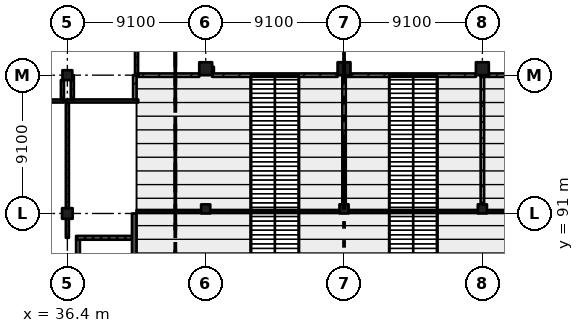
"""IFC4 building model, lengths in metres.
Left out: names, types, materials, properties, quantities, classifications, styles, units other than length and angle.
Written with IfcOpenShell. Run it as: python <this file> out.ifc"""

import sys

from ifc_helpers import new_model, si_unit, direction, frame, frame_2d, origin, origin_2d, place, context, subcontext, project, spatial, rectangle, extrude, element, fill, save


model = new_model("IFC4")
c1 = context("Model", 3, precision=1e-05, world=origin(), true_north=direction((0.0, 1.0)))
c2 = subcontext(c1, "Body", "Model", "MODEL_VIEW")
j1 = project(units=[si_unit("LENGTHUNIT", "METRE"), si_unit("PLANEANGLEUNIT", "RADIAN")], contexts=[c1])
p1 = place(None, origin())
s1 = spatial("IfcSite", under=j1, at=p1, CompositionType="ELEMENT")
p2 = place(p1, origin())
s2 = spatial("IfcBuilding", under=s1, at=p2, CompositionType="ELEMENT")
p3 = place(p2, frame((0.0, 0.0, 15.47)))
s3 = spatial("IfcBuildingStorey", under=s2, at=p3, CompositionType="ELEMENT", Elevation=15.47)
p4 = place(p3, frame((36.4, 91.0, 0.0), z_axis=(0.0, 0.0, 1.0), x_axis=(1.0, 0.0, 0.0)))
e1 = element("IfcColumn", 1, at=p4, inside=s3, PredefinedType="COLUMN", context=c2, shape_type="SweptSolid", body=[
    extrude(rectangle(XDim=0.7, YDim=0.7, at=origin_2d()), origin(), (0.0, 0.0, 1.0), 4.55),
])
p5 = place(p3, frame((36.4, 100.1, 0.0), z_axis=(0.0, 0.0, 1.0), x_axis=(1.0, 0.0, 0.0)))
e2 = element("IfcColumn", 2, at=p5, inside=s3, PredefinedType="COLUMN", context=c2, shape_type="SweptSolid", body=[
    extrude(rectangle(XDim=0.65, YDim=0.65, at=origin_2d()), origin(), (0.0, 0.0, 1.0), 4.55),
])
p6 = place(p3, frame((45.5, 91.3, 0.0), z_axis=(0.0, 0.0, 1.0), x_axis=(1.0, 0.0, 0.0)))
e3 = element("IfcColumn", 3, at=p6, inside=s3, PredefinedType="COLUMN", context=c2, shape_type="SweptSolid", body=[
    extrude(rectangle(XDim=0.6, YDim=0.6, at=origin_2d()), origin(), (0.0, 0.0, 1.0), 2.71),
])
p7 = place(p3, frame((45.5, 100.525, 0.0), z_axis=(0.0, 0.0, 1.0), x_axis=(1.0, 0.0, 0.0)))
e4 = element("IfcColumn", 4, at=p7, inside=s3, PredefinedType="COLUMN", context=c2, shape_type="SweptSolid", body=[
    extrude(rectangle(XDim=0.85, YDim=0.85, at=origin_2d()), origin(), (0.0, 0.0, 1.0), 4.55),
])
p8 = place(p3, frame((54.6, 91.3, 0.0), z_axis=(0.0, 0.0, 1.0), x_axis=(1.0, 0.0, 0.0)))
e5 = element("IfcColumn", 5, at=p8, inside=s3, PredefinedType="COLUMN", context=c2, shape_type="SweptSolid", body=[
    extrude(rectangle(XDim=0.6, YDim=0.6, at=origin_2d()), origin(), (0.0, 0.0, 1.0), 2.71),
])
p9 = place(p3, frame((54.6, 100.525, 0.0), z_axis=(0.0, 0.0, 1.0), x_axis=(1.0, 0.0, 0.0)))
e6 = element("IfcColumn", 6, at=p9, inside=s3, PredefinedType="COLUMN", context=c2, shape_type="SweptSolid", body=[
    extrude(rectangle(XDim=0.85, YDim=0.85, at=origin_2d()), origin(), (0.0, 0.0, 1.0), 4.55),
])
p10 = place(p3, frame((63.7, 91.3, 0.0), z_axis=(0.0, 0.0, 1.0), x_axis=(1.0, 0.0, 0.0)))
e7 = element("IfcColumn", 7, at=p10, inside=s3, PredefinedType="COLUMN", context=c2, shape_type="SweptSolid", body=[
    extrude(rectangle(XDim=0.6, YDim=0.6, at=origin_2d()), origin(), (0.0, 0.0, 1.0), 2.71),
])
p11 = place(p3, frame((63.7, 100.525, 0.0), z_axis=(0.0, 0.0, 1.0), x_axis=(1.0, 0.0, 0.0)))
e8 = element("IfcColumn", 8, at=p11, inside=s3, PredefinedType="COLUMN", context=c2, shape_type="SweptSolid", body=[
    extrude(rectangle(XDim=0.85, YDim=0.85, at=origin_2d()), origin(), (0.0, 0.0, 1.0), 4.55),
])
p12 = place(p3, frame((40.8, 68.25, 0.0), z_axis=(0.0, 0.0, 1.0), x_axis=(0.0, 1.0, 0.0)))
e9 = element("IfcWall", 9, at=p12, inside=s3, PredefinedType="SHEAR", context=c2, shape_type="SweptSolid", body=[
    extrude(rectangle(XDim=22.75, YDim=0.3, at=frame_2d((11.375, 0.0))), origin(), (0.0, 0.0, 1.0), 4.55),
])
p13 = place(p3, frame((33.43, 98.4, 0.0), z_axis=(0.0, 0.0, 1.0), x_axis=(1.0, 0.0, 0.0)))
e10 = element("IfcWall", 10, at=p13, inside=s3, PredefinedType="PARTITIONING", context=c2, shape_type="SweptSolid", body=[
    extrude(rectangle(XDim=2.745, YDim=0.2, at=frame_2d((1.373, 0.0))), origin(), (0.0, 0.0, 1.0), 4.3),
])
p14 = place(p13, frame((0.45, 0.0, 0.0)))
e11 = element("IfcOpeningElement", 11, at=p14, cuts=e10, PredefinedType="OPENING", context=c2, shape_type="SweptSolid", body=[
    extrude(rectangle(XDim=1.8, YDim=2.4, at=frame_2d((0.9, 1.2))), frame((0.0, 0.11, 0.0), z_axis=(0.0, -1.0, 0.0), x_axis=(1.0, 0.0, 0.0)), (0.0, 0.0, 1.0), 0.22),
])
p15 = place(p3, frame((36.075, 98.5, 0.0), z_axis=(0.0, 0.0, 1.0), x_axis=(0.0, 1.0, 0.0)))
e12 = element("IfcWall", 12, at=p15, inside=s3, PredefinedType="PARTITIONING", context=c2, shape_type="SweptSolid", body=[
    extrude(rectangle(XDim=1.275, YDim=0.2, at=frame_2d((0.637, 0.0))), origin(), (0.0, 0.0, 1.0), 4.3),
])
p16 = place(p3, frame((36.4, 90.65, 0.0), z_axis=(0.0, 0.0, 1.0), x_axis=(0.0, -1.0, 0.0)))
e13 = element("IfcWall", 13, at=p16, inside=s3, PredefinedType="PARTITIONING", context=c2, shape_type="SweptSolid", body=[
    extrude(rectangle(XDim=1.25, YDim=0.2, at=frame_2d((0.625, 0.0))), origin(), (0.0, 0.0, 1.0), 3.55),
])
p17 = place(p3, frame((36.4, 98.3, 0.0), z_axis=(0.0, 0.0, 1.0), x_axis=(0.0, -1.0, 0.0)))
e14 = element("IfcWall", 14, at=p17, inside=s3, PredefinedType="PARTITIONING", context=c2, shape_type="SweptSolid", body=[
    extrude(rectangle(XDim=6.95, YDim=0.2, at=frame_2d((3.475, 0.0))), origin(), (0.0, 0.0, 1.0), 3.55),
])
p18 = place(p17, frame((0.85, 0.0, 0.0)))
e15 = element("IfcOpeningElement", 15, at=p18, cuts=e14, PredefinedType="OPENING", context=c2, shape_type="SweptSolid", body=[
    extrude(rectangle(XDim=1.8, YDim=2.4, at=frame_2d((0.9, 1.2))), frame((0.0, 0.11, 0.0), z_axis=(0.0, -1.0, 0.0), x_axis=(1.0, 0.0, 0.0)), (0.0, 0.0, 1.0), 0.22),
])
p19 = place(p17, frame((4.35, 0.0, 0.0)))
e16 = element("IfcOpeningElement", 16, at=p19, cuts=e14, PredefinedType="OPENING", context=c2, shape_type="SweptSolid", body=[
    extrude(rectangle(XDim=1.8, YDim=2.4, at=frame_2d((0.9, 1.2))), frame((0.0, 0.11, 0.0), z_axis=(0.0, -1.0, 0.0), x_axis=(1.0, 0.0, 0.0)), (0.0, 0.0, 1.0), 0.22),
])
p20 = place(p3, frame((36.3, 98.4, 0.0), z_axis=(0.0, 0.0, 1.0), x_axis=(1.0, 0.0, 0.0)))
e17 = element("IfcWall", 17, at=p20, inside=s3, PredefinedType="PARTITIONING", context=c2, shape_type="SweptSolid", body=[
    extrude(rectangle(XDim=4.762, YDim=0.2, at=frame_2d((2.381, 0.0))), origin(), (0.0, 0.0, 1.0), 4.3),
])
p21 = place(p20, frame((1.675, 0.0, 0.0)))
e18 = element("IfcOpeningElement", 18, at=p21, cuts=e17, PredefinedType="OPENING", context=c2, shape_type="SweptSolid", body=[
    extrude(rectangle(XDim=1.8, YDim=2.4, at=frame_2d((0.9, 1.2))), frame((0.0, 0.11, 0.0), z_axis=(0.0, -1.0, 0.0), x_axis=(1.0, 0.0, 0.0)), (0.0, 0.0, 1.0), 0.22),
])
p22 = place(p3, frame((36.725, 98.5, 0.0), z_axis=(0.0, 0.0, 1.0), x_axis=(0.0, 1.0, 0.0)))
e19 = element("IfcWall", 19, at=p22, inside=s3, PredefinedType="PARTITIONING", context=c2, shape_type="SweptSolid", body=[
    extrude(rectangle(XDim=1.6, YDim=0.2, at=frame_2d((0.8, 0.0))), origin(), (0.0, 0.0, 1.0), 4.3),
])
p23 = place(p3, frame((37.1, 89.275, 0.0), z_axis=(0.0, 0.0, 1.0), x_axis=(0.0, -1.0, 0.0)))
e20 = element("IfcWall", 20, at=p23, inside=s3, PredefinedType="SOLIDWALL", context=c2, shape_type="SweptSolid", body=[
    extrude(rectangle(XDim=6.925, YDim=0.25, at=frame_2d((3.462, 0.0))), origin(), (0.0, 0.0, 1.0), 4.3),
])
p24 = place(p3, frame((40.65, 89.4, 0.0), z_axis=(0.0, 0.0, 1.0), x_axis=(-1.0, 0.0, 0.0)))
e21 = element("IfcWall", 21, at=p24, inside=s3, PredefinedType="SOLIDWALL", context=c2, shape_type="SweptSolid", body=[
    extrude(rectangle(XDim=3.675, YDim=0.25, at=frame_2d((1.837, 0.0))), origin(), (0.0, 0.0, 1.0), 4.3),
])
p25 = place(p24, frame((1.35, 0.0, 0.0)))
e22 = element("IfcOpeningElement", 22, at=p25, cuts=e21, PredefinedType="OPENING", context=c2, shape_type="SweptSolid", body=[
    extrude(rectangle(XDim=1.0, YDim=2.1, at=frame_2d((0.5, 1.05))), frame((0.0, 0.135, 0.0), z_axis=(0.0, -1.0, 0.0), x_axis=(1.0, 0.0, 0.0)), (0.0, 0.0, 1.0), 0.27),
])
p26 = place(p3, frame((40.836, 100.1, 0.0), z_axis=(0.0, 0.0, 1.0), x_axis=(0.0, -1.0, 0.0)))
e23 = element("IfcWall", 23, at=p26, inside=s3, PredefinedType="PARTITIONING", context=c2, shape_type="SweptSolid", body=[
    extrude(rectangle(XDim=1.6, YDim=0.225, at=frame_2d((0.8, 0.0))), origin(), (0.0, 0.0, 1.0), 4.3),
])
p27 = place(p3, frame((40.95, 103.7, 0.0), z_axis=(0.0, 0.0, 1.0), x_axis=(0.0, -1.0, 0.0)))
e24 = element("IfcWall", 24, at=p27, inside=s3, PredefinedType="PARTITIONING", context=c2, shape_type="SweptSolid", body=[
    extrude(rectangle(XDim=3.6, YDim=0.2, at=frame_2d((1.8, 0.0))), origin(), (0.0, 0.0, 1.0), 3.7),
])
p28 = place(p27, frame((0.65, 0.0, 0.0)))
e25 = element("IfcOpeningElement", 25, at=p28, cuts=e24, PredefinedType="OPENING", context=c2, shape_type="SweptSolid", body=[
    extrude(rectangle(XDim=2.4, YDim=2.4, at=frame_2d((1.2, 1.2))), frame((0.0, 0.11, 0.0), z_axis=(0.0, -1.0, 0.0), x_axis=(1.0, 0.0, 0.0)), (0.0, 0.0, 1.0), 0.22),
])
p29 = place(p3, frame((45.075, 100.1, 0.0), z_axis=(0.0, 0.0, 1.0), x_axis=(-1.0, 0.0, 0.0)))
e26 = element("IfcWall", 26, at=p29, inside=s3, PredefinedType="PARTITIONING", context=c2, shape_type="SweptSolid", body=[
    extrude(rectangle(XDim=4.012, YDim=0.225, at=frame_2d((2.006, 0.0))), origin(), (0.0, 0.0, 1.0), 3.6),
])
p30 = place(p3, frame((45.925, 100.225, 0.0), z_axis=(0.0, 0.0, 1.0), x_axis=(0.0, 1.0, 0.0)))
e27 = element("IfcWall", 27, at=p30, inside=s3, PredefinedType="PARTITIONING", context=c2, shape_type="SweptSolid", body=[
    extrude(rectangle(XDim=0.425, YDim=0.225, at=frame_2d((0.212, 0.0))), origin(), (0.0, 0.0, 1.0), 4.3),
])
p31 = place(p3, frame((54.175, 100.1, 0.0), z_axis=(0.0, 0.0, 1.0), x_axis=(-1.0, 0.0, 0.0)))
e28 = element("IfcWall", 28, at=p31, inside=s3, PredefinedType="PARTITIONING", context=c2, shape_type="SweptSolid", body=[
    extrude(rectangle(XDim=8.25, YDim=0.225, at=frame_2d((4.125, 0.0))), origin(), (0.0, 0.0, 1.0), 3.6),
])
p32 = place(p31, frame((3.65, 0.0, 0.0)))
e29 = element("IfcOpeningElement", 29, at=p32, cuts=e28, PredefinedType="OPENING", context=c2, shape_type="SweptSolid", body=[
    extrude(rectangle(XDim=1.0, YDim=2.4, at=frame_2d((0.5, 1.2))), frame((0.0, 0.123, 0.0), z_axis=(0.0, -1.0, 0.0), x_axis=(1.0, 0.0, 0.0)), (0.0, 0.0, 1.0), 0.245),
])
p33 = place(p3, frame((54.6, 98.27, 0.0), z_axis=(0.0, 0.0, 1.0), x_axis=(0.0, -1.0, 0.0)))
e30 = element("IfcWall", 30, at=p33, inside=s3, PredefinedType="PARTITIONING", context=c2, shape_type="SweptSolid", body=[
    extrude(rectangle(XDim=6.67, YDim=0.225, at=frame_2d((3.335, 0.0))), origin(), (0.0, 0.0, 1.0), 3.22),
])
p34 = place(p3, frame((54.6, 99.988, 0.0), z_axis=(0.0, 0.0, 1.0), x_axis=(0.0, -1.0, 0.0)))
e31 = element("IfcWall", 31, at=p34, inside=s3, PredefinedType="PARTITIONING", context=c2, shape_type="SweptSolid", body=[
    extrude(rectangle(XDim=1.657, YDim=0.225, at=frame_2d((0.829, 0.0))), origin(), (0.0, 0.0, 1.0), 3.22),
])
p35 = place(p3, frame((55.025, 100.1, 0.0), z_axis=(0.0, 0.0, 1.0), x_axis=(-1.0, 0.0, 0.0)))
e32 = element("IfcWall", 32, at=p35, inside=s3, PredefinedType="PARTITIONING", context=c2, shape_type="SweptSolid", body=[
    extrude(rectangle(XDim=0.537, YDim=0.225, at=frame_2d((0.269, 0.0))), origin(), (0.0, 0.0, 1.0), 3.22),
])
p36 = place(p3, frame((63.275, 100.1, 0.0), z_axis=(0.0, 0.0, 1.0), x_axis=(-1.0, 0.0, 0.0)))
e33 = element("IfcWall", 33, at=p36, inside=s3, PredefinedType="PARTITIONING", context=c2, shape_type="SweptSolid", body=[
    extrude(rectangle(XDim=8.25, YDim=0.225, at=frame_2d((4.125, 0.0))), origin(), (0.0, 0.0, 1.0), 3.6),
])
p37 = place(p36, frame((3.65, 0.0, 0.0)))
e34 = element("IfcOpeningElement", 34, at=p37, cuts=e33, PredefinedType="OPENING", context=c2, shape_type="SweptSolid", body=[
    extrude(rectangle(XDim=1.0, YDim=2.4, at=frame_2d((0.5, 1.2))), frame((0.0, 0.123, 0.0), z_axis=(0.0, -1.0, 0.0), x_axis=(1.0, 0.0, 0.0)), (0.0, 0.0, 1.0), 0.245),
])
p38 = place(p3, frame((63.7, 98.27, 0.0), z_axis=(0.0, 0.0, 1.0), x_axis=(0.0, -1.0, 0.0)))
e35 = element("IfcWall", 35, at=p38, inside=s3, PredefinedType="PARTITIONING", context=c2, shape_type="SweptSolid", body=[
    extrude(rectangle(XDim=6.67, YDim=0.225, at=frame_2d((3.335, 0.0))), origin(), (0.0, 0.0, 1.0), 3.22),
])
p39 = place(p3, frame((63.7, 99.988, 0.0), z_axis=(0.0, 0.0, 1.0), x_axis=(0.0, -1.0, 0.0)))
e36 = element("IfcWall", 36, at=p39, inside=s3, PredefinedType="PARTITIONING", context=c2, shape_type="SweptSolid", body=[
    extrude(rectangle(XDim=1.657, YDim=0.225, at=frame_2d((0.829, 0.0))), origin(), (0.0, 0.0, 1.0), 3.22),
])
p40 = place(p3, frame((64.125, 100.1, 0.0), z_axis=(0.0, 0.0, 1.0), x_axis=(-1.0, 0.0, 0.0)))
e37 = element("IfcWall", 37, at=p40, inside=s3, PredefinedType="PARTITIONING", context=c2, shape_type="SweptSolid", body=[
    extrude(rectangle(XDim=0.538, YDim=0.225, at=frame_2d((0.269, 0.0))), origin(), (0.0, 0.0, 1.0), 3.22),
])
p41 = place(p3, frame((72.375, 100.1, 0.0), z_axis=(0.0, 0.0, 1.0), x_axis=(-1.0, 0.0, 0.0)))
e38 = element("IfcWall", 38, at=p41, inside=s3, PredefinedType="PARTITIONING", context=c2, shape_type="SweptSolid", body=[
    extrude(rectangle(XDim=8.25, YDim=0.225, at=frame_2d((4.125, 0.0))), origin(), (0.0, 0.0, 1.0), 3.6),
])
p42 = place(p41, frame((3.65, 0.0, 0.0)))
e39 = element("IfcOpeningElement", 39, at=p42, cuts=e38, PredefinedType="OPENING", context=c2, shape_type="SweptSolid", body=[
    extrude(rectangle(XDim=1.0, YDim=2.4, at=frame_2d((0.5, 1.2))), frame((0.0, 0.123, 0.0), z_axis=(0.0, -1.0, 0.0), x_axis=(1.0, 0.0, 0.0)), (0.0, 0.0, 1.0), 0.245),
])
p43 = place(p3, frame((54.3, 91.13, 0.0), z_axis=(0.0, 0.0, 1.0), x_axis=(-1.0, 0.0, 0.0)))
e40 = element("IfcWall", 40, at=p43, inside=s3, PredefinedType="PARTITIONING", context=c2, shape_type="SweptSolid", body=[
    extrude(rectangle(XDim=8.5, YDim=0.2, at=frame_2d((4.25, 0.0))), origin(), (0.0, 0.0, 1.0), 2.71),
])
p44 = place(p43, frame((1.25, 0.0, 1.1)))
e41 = element("IfcOpeningElement", 41, at=p44, cuts=e40, PredefinedType="OPENING", context=c2, shape_type="SweptSolid", body=[
    extrude(rectangle(XDim=6.0, YDim=1.3, at=frame_2d((3.0, 0.65))), frame((0.0, 0.11, 0.0), z_axis=(0.0, -1.0, 0.0), x_axis=(1.0, 0.0, 0.0)), (0.0, 0.0, 1.0), 0.22),
])
p45 = place(p3, frame((45.2, 91.13, 0.0), z_axis=(0.0, 0.0, 1.0), x_axis=(-1.0, 0.0, 0.0)))
e42 = element("IfcWall", 42, at=p45, inside=s3, PredefinedType="PARTITIONING", context=c2, shape_type="SweptSolid", body=[
    extrude(rectangle(XDim=4.25, YDim=0.2, at=frame_2d((2.125, 0.0))), origin(), (0.0, 0.0, 1.0), 2.91),
])
p46 = place(p45, frame((1.125, 0.0, 1.1)))
e43 = element("IfcOpeningElement", 43, at=p46, cuts=e42, PredefinedType="OPENING", context=c2, shape_type="SweptSolid", body=[
    extrude(rectangle(XDim=2.0, YDim=1.3, at=frame_2d((1.0, 0.65))), frame((0.0, 0.11, 0.0), z_axis=(0.0, -1.0, 0.0), x_axis=(1.0, 0.0, 0.0)), (0.0, 0.0, 1.0), 0.22),
])
p47 = place(p3, frame((63.4, 91.13, 0.0), z_axis=(0.0, 0.0, 1.0), x_axis=(-1.0, 0.0, 0.0)))
e44 = element("IfcWall", 44, at=p47, inside=s3, PredefinedType="PARTITIONING", context=c2, shape_type="SweptSolid", body=[
    extrude(rectangle(XDim=8.5, YDim=0.2, at=frame_2d((4.25, 0.0))), origin(), (0.0, 0.0, 1.0), 2.71),
])
p48 = place(p47, frame((1.25, 0.0, 1.1)))
e45 = element("IfcOpeningElement", 45, at=p48, cuts=e44, PredefinedType="OPENING", context=c2, shape_type="SweptSolid", body=[
    extrude(rectangle(XDim=6.0, YDim=1.3, at=frame_2d((3.0, 0.65))), frame((0.0, 0.11, 0.0), z_axis=(0.0, -1.0, 0.0), x_axis=(1.0, 0.0, 0.0)), (0.0, 0.0, 1.0), 0.22),
])
p49 = place(p3, frame((72.5, 91.13, 0.0), z_axis=(0.0, 0.0, 1.0), x_axis=(-1.0, 0.0, 0.0)))
e46 = element("IfcWall", 46, at=p49, inside=s3, PredefinedType="PARTITIONING", context=c2, shape_type="SweptSolid", body=[
    extrude(rectangle(XDim=8.5, YDim=0.2, at=frame_2d((4.25, 0.0))), origin(), (0.0, 0.0, 1.0), 2.71),
])
p50 = place(p49, frame((1.25, 0.0, 1.1)))
e47 = element("IfcOpeningElement", 47, at=p50, cuts=e46, PredefinedType="OPENING", context=c2, shape_type="SweptSolid", body=[
    extrude(rectangle(XDim=6.0, YDim=1.3, at=frame_2d((3.0, 0.65))), frame((0.0, 0.11, 0.0), z_axis=(0.0, -1.0, 0.0), x_axis=(1.0, 0.0, 0.0)), (0.0, 0.0, 1.0), 0.22),
])
p51 = place(p44, origin())
e48 = element("IfcWindow", 48, at=p51, inside=s3, PartitioningType="SINGLE_PANEL", PredefinedType="WINDOW", context=c2, shape_type="SweptSolid", body=[
    extrude(rectangle(XDim=6.0, YDim=1.3, at=frame_2d((3.0, 0.65))), frame((0.0, 0.03, 0.0), z_axis=(0.0, -1.0, 0.0), x_axis=(1.0, 0.0, 0.0)), (0.0, 0.0, 1.0), 0.06),
])
fill(e41, e48)
p52 = place(p46, origin())
e49 = element("IfcWindow", 49, at=p52, inside=s3, PartitioningType="SINGLE_PANEL", PredefinedType="WINDOW", context=c2, shape_type="SweptSolid", body=[
    extrude(rectangle(XDim=2.0, YDim=1.3, at=frame_2d((1.0, 0.65))), frame((0.0, 0.03, 0.0), z_axis=(0.0, -1.0, 0.0), x_axis=(1.0, 0.0, 0.0)), (0.0, 0.0, 1.0), 0.06),
])
fill(e43, e49)
p53 = place(p48, origin())
e50 = element("IfcWindow", 50, at=p53, inside=s3, PartitioningType="SINGLE_PANEL", PredefinedType="WINDOW", context=c2, shape_type="SweptSolid", body=[
    extrude(rectangle(XDim=6.0, YDim=1.3, at=frame_2d((3.0, 0.65))), frame((0.0, 0.03, 0.0), z_axis=(0.0, -1.0, 0.0), x_axis=(1.0, 0.0, 0.0)), (0.0, 0.0, 1.0), 0.06),
])
fill(e45, e50)
p54 = place(p25, origin())
e51 = element("IfcDoor", 51, at=p54, inside=s3, OperationType="SINGLE_SWING_LEFT", PredefinedType="DOOR", context=c2, shape_type="SweptSolid", body=[
    extrude(rectangle(XDim=1.0, YDim=2.1, at=frame_2d((0.5, 1.05))), frame((0.0, 0.025, 0.0), z_axis=(0.0, -1.0, 0.0), x_axis=(1.0, 0.0, 0.0)), (0.0, 0.0, 1.0), 0.05),
])
fill(e22, e51)
p55 = place(p32, origin())
e52 = element("IfcDoor", 52, at=p55, inside=s3, OperationType="SINGLE_SWING_LEFT", PredefinedType="DOOR", context=c2, shape_type="SweptSolid", body=[
    extrude(rectangle(XDim=1.0, YDim=2.4, at=frame_2d((0.5, 1.2))), frame((0.0, 0.025, 0.0), z_axis=(0.0, -1.0, 0.0), x_axis=(1.0, 0.0, 0.0)), (0.0, 0.0, 1.0), 0.05),
])
fill(e29, e52)
p56 = place(p37, origin())
e53 = element("IfcDoor", 53, at=p56, inside=s3, OperationType="SINGLE_SWING_LEFT", PredefinedType="DOOR", context=c2, shape_type="SweptSolid", body=[
    extrude(rectangle(XDim=1.0, YDim=2.4, at=frame_2d((0.5, 1.2))), frame((0.0, 0.025, 0.0), z_axis=(0.0, -1.0, 0.0), x_axis=(1.0, 0.0, 0.0)), (0.0, 0.0, 1.0), 0.05),
])
fill(e34, e53)
p57 = place(p18, origin())
e54 = element("IfcDoor", 54, at=p57, inside=s3, OperationType="DOUBLE_DOOR_SINGLE_SWING", PredefinedType="DOOR", context=c2, shape_type="SweptSolid", body=[
    extrude(rectangle(XDim=1.8, YDim=2.4, at=frame_2d((0.9, 1.2))), frame((0.0, 0.025, 0.0), z_axis=(0.0, -1.0, 0.0), x_axis=(1.0, 0.0, 0.0)), (0.0, 0.0, 1.0), 0.05),
])
fill(e15, e54)
p58 = place(p19, origin())
e55 = element("IfcDoor", 55, at=p58, inside=s3, OperationType="DOUBLE_DOOR_SINGLE_SWING", PredefinedType="DOOR", context=c2, shape_type="SweptSolid", body=[
    extrude(rectangle(XDim=1.8, YDim=2.4, at=frame_2d((0.9, 1.2))), frame((0.0, 0.025, 0.0), z_axis=(0.0, -1.0, 0.0), x_axis=(1.0, 0.0, 0.0)), (0.0, 0.0, 1.0), 0.05),
])
fill(e16, e55)
p59 = place(p14, origin())
e56 = element("IfcDoor", 56, at=p59, inside=s3, OperationType="DOUBLE_DOOR_SINGLE_SWING", PredefinedType="DOOR", context=c2, shape_type="SweptSolid", body=[
    extrude(rectangle(XDim=1.8, YDim=2.4, at=frame_2d((0.9, 1.2))), frame((0.0, 0.025, 0.0), z_axis=(0.0, -1.0, 0.0), x_axis=(1.0, 0.0, 0.0)), (0.0, 0.0, 1.0), 0.05),
])
fill(e11, e56)
p60 = place(p21, origin())
e57 = element("IfcDoor", 57, at=p60, inside=s3, OperationType="DOUBLE_DOOR_SINGLE_SWING", PredefinedType="DOOR", context=c2, shape_type="SweptSolid", body=[
    extrude(rectangle(XDim=1.8, YDim=2.4, at=frame_2d((0.9, 1.2))), frame((0.0, 0.025, 0.0), z_axis=(0.0, -1.0, 0.0), x_axis=(1.0, 0.0, 0.0)), (0.0, 0.0, 1.0), 0.05),
])
fill(e18, e57)
p61 = place(p28, origin())
e58 = element("IfcDoor", 58, at=p61, inside=s3, OperationType="DOUBLE_DOOR_SINGLE_SWING", PredefinedType="DOOR", context=c2, shape_type="SweptSolid", body=[
    extrude(rectangle(XDim=2.4, YDim=2.4, at=frame_2d((1.2, 1.2))), frame((0.0, 0.025, 0.0), z_axis=(0.0, -1.0, 0.0), x_axis=(1.0, 0.0, 0.0)), (0.0, 0.0, 1.0), 0.05),
])
fill(e25, e58)
save(model, sys.argv[1])
